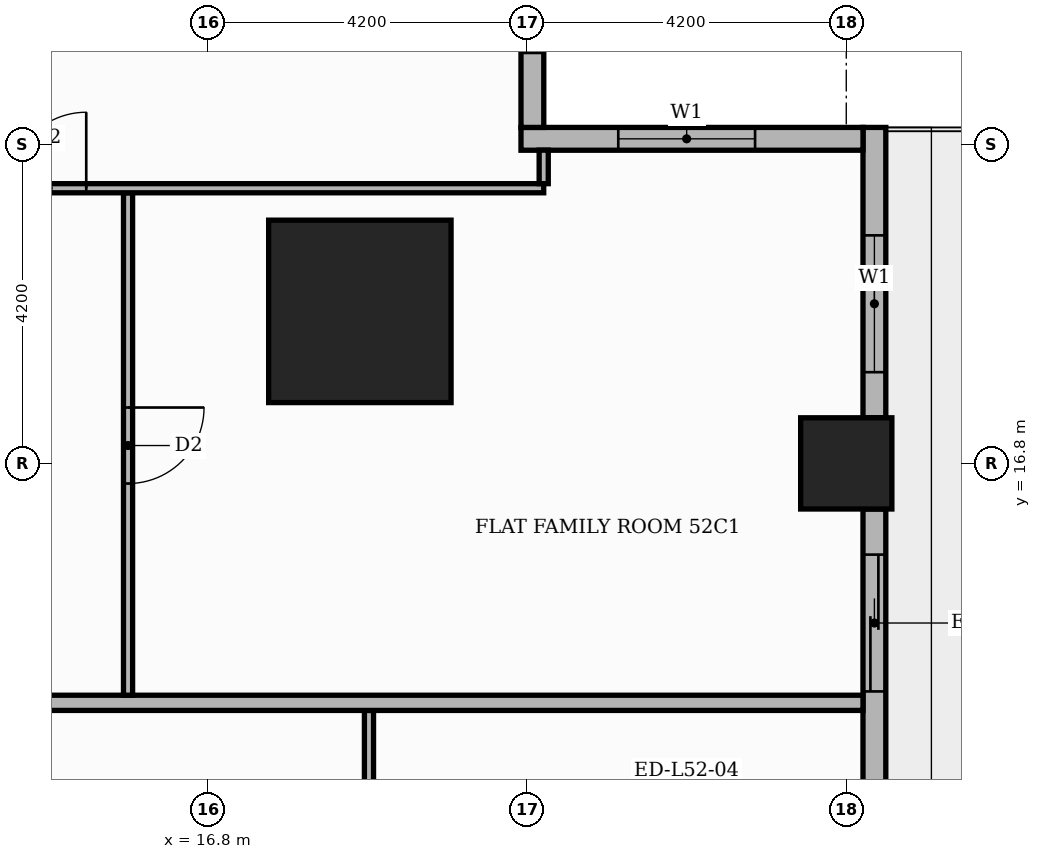
"""IFC4 building model, lengths in metres.
Left out: names, types, materials, properties, quantities, classifications, styles, units other than length and angle.
Written with IfcOpenShell. Run it as: python <this file> out.ifc"""

import sys

from ifc_helpers import new_model, si_unit, direction, frame, frame_2d, origin, origin_2d, place, context, subcontext, project, spatial, rectangle, extrude, element, fill, save


model = new_model("IFC4")
c1 = context("Model", 3, precision=1e-05, world=origin(), true_north=direction((0.0, 1.0)))
c2 = subcontext(c1, "Body", "Model", "MODEL_VIEW")
j1 = project(units=[si_unit("LENGTHUNIT", "METRE"), si_unit("PLANEANGLEUNIT", "RADIAN")], contexts=[c1])
p1 = place(None, origin())
s1 = spatial("IfcSite", under=j1, at=p1, CompositionType="ELEMENT")
p2 = place(p1, origin())
s2 = spatial("IfcBuilding", under=s1, at=p2, CompositionType="ELEMENT")
p3 = place(p2, frame((0.0, 0.0, 219.6)))
s3 = spatial("IfcBuildingStorey", under=s2, at=p3, CompositionType="ELEMENT", Elevation=219.6)
p4 = place(p3, frame((18.8, 18.8, 0.0), z_axis=(0.0, 0.0, 1.0), x_axis=(1.0, 0.0, 0.0)))
e1 = element("IfcColumn", 1, at=p4, inside=s3, PredefinedType="COLUMN", context=c2, shape_type="SweptSolid", body=[
    extrude(rectangle(XDim=2.4, YDim=2.4, at=origin_2d()), origin(), (0.0, 0.0, 1.0), 3.9),
])
p5 = place(p3, frame((25.2, 16.8, 0.0), z_axis=(0.0, 0.0, 1.0), x_axis=(1.0, 0.0, 0.0)))
e2 = element("IfcColumn", 2, at=p5, inside=s3, PredefinedType="COLUMN", context=c2, shape_type="SweptSolid", body=[
    extrude(rectangle(XDim=1.2, YDim=1.2, at=origin_2d()), origin(), (0.0, 0.0, 1.0), 3.9),
])
p6 = place(p3, frame((25.57, 11.85, 0.0), z_axis=(0.0, 0.0, 1.0), x_axis=(0.0, 1.0, 0.0)))
e3 = element("IfcWall", 3, at=p6, inside=s3, PredefinedType="STANDARD", context=c2, shape_type="SweptSolid", body=[
    extrude(rectangle(XDim=4.35, YDim=0.3, at=frame_2d((2.175, 0.0))), origin(), (0.0, 0.0, 1.0), 3.48),
])
p7 = place(p6, frame((1.95, 0.0, 0.0)))
e4 = element("IfcOpeningElement", 4, at=p7, cuts=e3, PredefinedType="OPENING", context=c2, shape_type="SweptSolid", body=[
    extrude(rectangle(XDim=1.8, YDim=2.4, at=frame_2d((0.9, 1.2))), frame((0.0, 0.16, 0.0), z_axis=(0.0, -1.0, 0.0), x_axis=(1.0, 0.0, 0.0)), (0.0, 0.0, 1.0), 0.32),
])
p8 = place(p3, frame((25.57, 17.4, 0.0), z_axis=(0.0, 0.0, 1.0), x_axis=(0.0, 1.0, 0.0)))
e5 = element("IfcWall", 5, at=p8, inside=s3, PredefinedType="STANDARD", context=c2, shape_type="SweptSolid", body=[
    extrude(rectangle(XDim=3.82, YDim=0.3, at=frame_2d((1.91, 0.0))), origin(), (0.0, 0.0, 1.0), 3.48),
])
p9 = place(p8, frame((0.6, 0.0, 0.9)))
e6 = element("IfcOpeningElement", 6, at=p9, cuts=e5, PredefinedType="OPENING", context=c2, shape_type="SweptSolid", body=[
    extrude(rectangle(XDim=1.8, YDim=2.1, at=frame_2d((0.9, 1.05))), frame((0.0, 0.16, 0.0), z_axis=(0.0, -1.0, 0.0), x_axis=(1.0, 0.0, 0.0)), (0.0, 0.0, 1.0), 0.32),
])
p10 = place(p3, frame((25.42, 21.07, 0.0), z_axis=(0.0, 0.0, 1.0), x_axis=(-1.0, 0.0, 0.0)))
e7 = element("IfcWall", 7, at=p10, inside=s3, PredefinedType="STANDARD", context=c2, shape_type="SweptSolid", body=[
    extrude(rectangle(XDim=4.5, YDim=0.3, at=frame_2d((2.25, 0.0))), origin(), (0.0, 0.0, 1.0), 3.48),
])
p11 = place(p10, frame((1.42, 0.0, 0.9)))
e8 = element("IfcOpeningElement", 8, at=p11, cuts=e7, PredefinedType="OPENING", context=c2, shape_type="SweptSolid", body=[
    extrude(rectangle(XDim=1.8, YDim=2.1, at=frame_2d((0.9, 1.05))), frame((0.0, 0.16, 0.0), z_axis=(0.0, -1.0, 0.0), x_axis=(1.0, 0.0, 0.0)), (0.0, 0.0, 1.0), 0.32),
])
p12 = place(p3, frame((21.07, 21.22, 0.0), z_axis=(0.0, 0.0, 1.0), x_axis=(0.0, 1.0, 0.0)))
e9 = element("IfcWall", 9, at=p12, inside=s3, PredefinedType="STANDARD", context=c2, shape_type="SweptSolid", body=[
    extrude(rectangle(XDim=4.5, YDim=0.3, at=frame_2d((2.25, 0.0))), origin(), (0.0, 0.0, 1.0), 3.48),
])
p13 = place(p12, frame((0.98, 0.0, 0.9)))
e10 = element("IfcOpeningElement", 10, at=p13, cuts=e9, PredefinedType="OPENING", context=c2, shape_type="SweptSolid", body=[
    extrude(rectangle(XDim=1.8, YDim=2.1, at=frame_2d((0.9, 1.05))), frame((0.0, 0.16, 0.0), z_axis=(0.0, -1.0, 0.0), x_axis=(1.0, 0.0, 0.0)), (0.0, 0.0, 1.0), 0.32),
])
p14 = place(p3, frame((18.92, 9.36, 0.0), z_axis=(0.0, 0.0, 1.0), x_axis=(0.0, 1.0, 0.0)))
e11 = element("IfcWall", 11, at=p14, inside=s3, PredefinedType="PARTITIONING", context=c2, shape_type="SweptSolid", body=[
    extrude(rectangle(XDim=4.19, YDim=0.12, at=frame_2d((2.095, 0.0))), origin(), (0.0, 0.0, 1.0), 3.48),
])
p15 = place(p14, frame((1.665, 0.0, 0.0)))
e12 = element("IfcOpeningElement", 12, at=p15, cuts=e11, PredefinedType="OPENING", context=c2, shape_type="SweptSolid", body=[
    extrude(rectangle(XDim=0.9, YDim=2.1, at=frame_2d((0.45, 1.05))), frame((0.0, 0.07, 0.0), z_axis=(0.0, -1.0, 0.0), x_axis=(1.0, 0.0, 0.0)), (0.0, 0.0, 1.0), 0.14),
])
p16 = place(p3, frame((-13.65, 13.65, 0.0), z_axis=(0.0, 0.0, 1.0), x_axis=(1.0, 0.0, 0.0)))
e13 = element("IfcWall", 13, at=p16, inside=s3, PredefinedType="PARTITIONING", context=c2, shape_type="SweptSolid", body=[
    extrude(rectangle(XDim=39.07, YDim=0.2, at=frame_2d((19.535, 0.0))), origin(), (0.0, 0.0, 1.0), 3.48),
])
p17 = place(p16, frame((24.65, 0.0, 0.0)))
e14 = element("IfcOpeningElement", 14, at=p17, cuts=e13, PredefinedType="OPENING", context=c2, shape_type="SweptSolid", body=[
    extrude(rectangle(XDim=1.1, YDim=2.4, at=frame_2d((0.55, 1.2))), frame((0.0, 0.11, 0.0), z_axis=(0.0, -1.0, 0.0), x_axis=(1.0, 0.0, 0.0)), (0.0, 0.0, 1.0), 0.22),
])
p18 = place(p16, frame((14.15, 0.0, 0.0)))
e15 = element("IfcOpeningElement", 15, at=p18, cuts=e13, PredefinedType="OPENING", context=c2, shape_type="SweptSolid", body=[
    extrude(rectangle(XDim=1.1, YDim=2.4, at=frame_2d((0.55, 1.2))), frame((0.0, 0.11, 0.0), z_axis=(0.0, -1.0, 0.0), x_axis=(1.0, 0.0, 0.0)), (0.0, 0.0, 1.0), 0.22),
])
p19 = place(p3, frame((15.75, 13.75, 0.0), z_axis=(0.0, 0.0, 1.0), x_axis=(0.0, 1.0, 0.0)))
e16 = element("IfcWall", 16, at=p19, inside=s3, PredefinedType="PARTITIONING", context=c2, shape_type="SweptSolid", body=[
    extrude(rectangle(XDim=6.61, YDim=0.12, at=frame_2d((3.305, 0.0))), origin(), (0.0, 0.0, 1.0), 3.48),
])
p20 = place(p19, frame((2.785, 0.0, 0.0)))
e17 = element("IfcOpeningElement", 17, at=p20, cuts=e16, PredefinedType="OPENING", context=c2, shape_type="SweptSolid", body=[
    extrude(rectangle(XDim=1.0, YDim=2.1, at=frame_2d((0.5, 1.05))), frame((0.0, 0.07, 0.0), z_axis=(0.0, -1.0, 0.0), x_axis=(1.0, 0.0, 0.0)), (0.0, 0.0, 1.0), 0.14),
])
p21 = place(p3, frame((5.35, 20.42, 0.0), z_axis=(0.0, 0.0, 1.0), x_axis=(1.0, 0.0, 0.0)))
e18 = element("IfcWall", 18, at=p21, inside=s3, PredefinedType="PARTITIONING", context=c2, shape_type="SweptSolid", body=[
    extrude(rectangle(XDim=15.869, YDim=0.12, at=frame_2d((7.935, 0.0))), origin(), (0.0, 0.0, 1.0), 3.48),
])
p22 = place(p21, frame((8.85, 0.0, 0.0)))
e19 = element("IfcOpeningElement", 19, at=p22, cuts=e18, PredefinedType="OPENING", context=c2, shape_type="SweptSolid", body=[
    extrude(rectangle(XDim=1.0, YDim=2.1, at=frame_2d((0.5, 1.05))), frame((0.0, 0.07, 0.0), z_axis=(0.0, -1.0, 0.0), x_axis=(1.0, 0.0, 0.0)), (0.0, 0.0, 1.0), 0.14),
])
p23 = place(p21, frame((5.75, 0.0, 0.0)))
e20 = element("IfcOpeningElement", 20, at=p23, cuts=e18, PredefinedType="OPENING", context=c2, shape_type="SweptSolid", body=[
    extrude(rectangle(XDim=0.9, YDim=2.1, at=frame_2d((0.45, 1.05))), frame((0.0, 0.07, 0.0), z_axis=(0.0, -1.0, 0.0), x_axis=(1.0, 0.0, 0.0)), (0.0, 0.0, 1.0), 0.14),
])
p24 = place(p3, frame((21.219, 20.48, 0.0), z_axis=(0.0, 0.0, 1.0), x_axis=(0.0, 1.0, 0.0)))
e21 = element("IfcWall", 21, at=p24, inside=s3, PredefinedType="PARTITIONING", context=c2, shape_type="SweptSolid", body=[
    extrude(rectangle(XDim=0.441, YDim=0.12, at=frame_2d((0.22, 0.0))), origin(), (0.0, 0.0, 1.0), 3.48),
])
p25 = place(p7, origin())
e22 = element("IfcDoor", 22, at=p25, inside=s3, OperationType="SLIDING_TO_RIGHT", PredefinedType="DOOR", context=c2, shape_type="SweptSolid", body=[
    extrude(rectangle(XDim=1.8, YDim=2.4, at=frame_2d((0.9, 1.2))), frame((0.0, 0.025, 0.0), z_axis=(0.0, -1.0, 0.0), x_axis=(1.0, 0.0, 0.0)), (0.0, 0.0, 1.0), 0.05),
])
fill(e4, e22)
p26 = place(p9, origin())
e23 = element("IfcWindow", 23, at=p26, inside=s3, PartitioningType="SINGLE_PANEL", PredefinedType="WINDOW", context=c2, shape_type="SweptSolid", body=[
    extrude(rectangle(XDim=1.8, YDim=2.1, at=frame_2d((0.9, 1.05))), frame((0.0, 0.03, 0.0), z_axis=(0.0, -1.0, 0.0), x_axis=(1.0, 0.0, 0.0)), (0.0, 0.0, 1.0), 0.06),
])
fill(e6, e23)
p27 = place(p11, origin())
e24 = element("IfcWindow", 24, at=p27, inside=s3, PartitioningType="SINGLE_PANEL", PredefinedType="WINDOW", context=c2, shape_type="SweptSolid", body=[
    extrude(rectangle(XDim=1.8, YDim=2.1, at=frame_2d((0.9, 1.05))), frame((0.0, 0.03, 0.0), z_axis=(0.0, -1.0, 0.0), x_axis=(1.0, 0.0, 0.0)), (0.0, 0.0, 1.0), 0.06),
])
fill(e8, e24)
p28 = place(p13, origin())
e25 = element("IfcWindow", 25, at=p28, inside=s3, PartitioningType="SINGLE_PANEL", PredefinedType="WINDOW", context=c2, shape_type="SweptSolid", body=[
    extrude(rectangle(XDim=1.8, YDim=2.1, at=frame_2d((0.9, 1.05))), frame((0.0, 0.03, 0.0), z_axis=(0.0, -1.0, 0.0), x_axis=(1.0, 0.0, 0.0)), (0.0, 0.0, 1.0), 0.06),
])
fill(e10, e25)
p29 = place(p20, frame((1.0, 0.0, 0.0), z_axis=(0.0, 0.0, 1.0), x_axis=(-1.0, 0.0, 0.0)))
e26 = element("IfcDoor", 26, at=p29, inside=s3, OperationType="SINGLE_SWING_RIGHT", PredefinedType="DOOR", context=c2, shape_type="SweptSolid", body=[
    extrude(rectangle(XDim=1.0, YDim=2.1, at=frame_2d((0.5, 1.05))), frame((0.0, 0.025, 0.0), z_axis=(0.0, -1.0, 0.0), x_axis=(1.0, 0.0, 0.0)), (0.0, 0.0, 1.0), 0.05),
])
fill(e17, e26)
p30 = place(p22, origin())
e27 = element("IfcDoor", 27, at=p30, inside=s3, OperationType="SINGLE_SWING_RIGHT", PredefinedType="DOOR", context=c2, shape_type="SweptSolid", body=[
    extrude(rectangle(XDim=1.0, YDim=2.1, at=frame_2d((0.5, 1.05))), frame((0.0, 0.025, 0.0), z_axis=(0.0, -1.0, 0.0), x_axis=(1.0, 0.0, 0.0)), (0.0, 0.0, 1.0), 0.05),
])
fill(e19, e27)
save(model, sys.argv[1])
